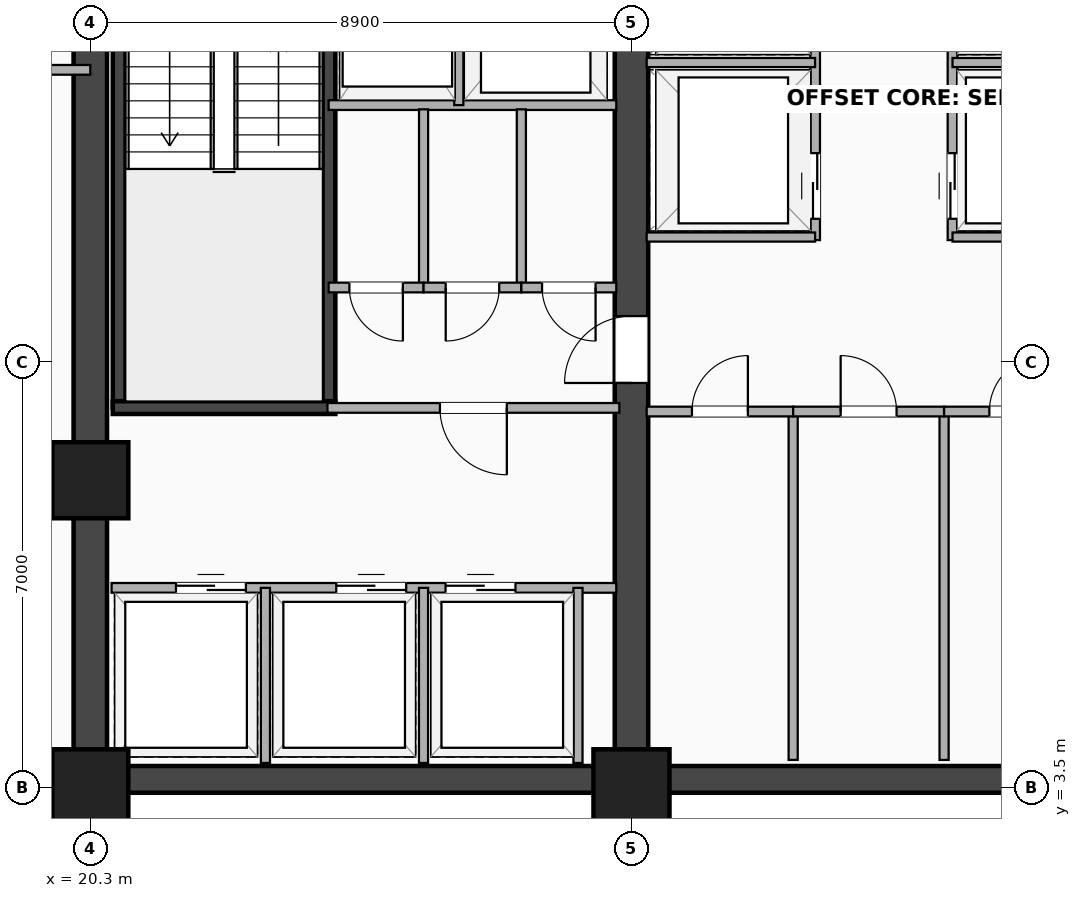
"""IFC4 building model, lengths in metres.
Left out: names, types, materials, properties, quantities, classifications, styles, units other than length and angle.
Written with IfcOpenShell. Run it as: python <this file> out.ifc"""

import sys

from ifc_helpers import new_model, si_unit, direction, frame, frame_2d, origin, origin_2d, place, context, subcontext, project, spatial, rectangle, extrude, element, fill, save


model = new_model("IFC4")
c1 = context("Model", 3, precision=1e-05, world=origin(), true_north=direction((0.0, 1.0)))
c2 = subcontext(c1, "Body", "Model", "MODEL_VIEW")
j1 = project(units=[si_unit("LENGTHUNIT", "METRE"), si_unit("PLANEANGLEUNIT", "RADIAN")], contexts=[c1])
p1 = place(None, origin())
s1 = spatial("IfcSite", under=j1, at=p1, CompositionType="ELEMENT")
p2 = place(p1, origin())
s2 = spatial("IfcBuilding", under=s1, at=p2, CompositionType="ELEMENT")
p3 = place(p2, frame((0.0, 0.0, 98.7)))
s3 = spatial("IfcBuildingStorey", under=s2, at=p3, CompositionType="ELEMENT", Elevation=98.7)
p4 = place(p3, frame((20.3, 3.63, 0.0), z_axis=(0.0, 0.0, 1.0), x_axis=(1.0, 0.0, 0.0)))
e1 = element("IfcWall", 1, at=p4, inside=s3, PredefinedType="SHEAR", context=c2, shape_type="SweptSolid", body=[
    extrude(rectangle(XDim=24.5, YDim=0.44, at=frame_2d((12.25, 0.0))), origin(), (0.0, 0.0, 1.0), 3.24),
])
p5 = place(p3, frame((20.3, 3.5, 0.0), z_axis=(0.0, 0.0, 1.0), x_axis=(0.0, 1.0, 0.0)))
e2 = element("IfcWall", 2, at=p5, inside=s3, PredefinedType="SHEAR", context=c2, shape_type="SweptSolid", body=[
    extrude(rectangle(XDim=16.9, YDim=0.55, at=frame_2d((8.45, 0.0))), origin(), (0.0, 0.0, 1.0), 3.24),
])
p6 = place(p3, frame((29.2, 3.5, 0.0), z_axis=(0.0, 0.0, 1.0), x_axis=(0.0, 1.0, 0.0)))
e3 = element("IfcWall", 3, at=p6, inside=s3, PredefinedType="SHEAR", context=c2, shape_type="SweptSolid", body=[
    extrude(rectangle(XDim=16.9, YDim=0.55, at=frame_2d((8.45, 0.0))), origin(), (0.0, 0.0, 1.0), 3.24),
])
p7 = place(p6, frame((7.75, 0.0, 0.0), z_axis=(0.0, 0.0, 1.0), x_axis=(-1.0, 0.0, 0.0)))
e4 = element("IfcOpeningElement", 4, at=p7, cuts=e3, PredefinedType="OPENING", context=c2, shape_type="SweptSolid", body=[
    extrude(rectangle(XDim=1.1, YDim=2.15, at=frame_2d((0.55, 1.075))), frame((0.0, 0.285, 0.0), z_axis=(0.0, -1.0, 0.0), x_axis=(1.0, 0.0, 0.0)), (0.0, 0.0, 1.0), 0.57),
])
for number, where, z_axis, x_axis in (
    (5, (20.775, 9.745, 0.0), (0.0, 0.0, 1.0), (0.0, 1.0, 0.0)),
    (6, (24.225, 9.745, 0.0), (0.0, 0.0, 1.0), (0.0, 1.0, 0.0)),
):
    element("IfcWall", number, at=place(p3, frame(where, z_axis=z_axis, x_axis=x_axis)), inside=s3, PredefinedType="SHEAR", context=c2, shape_type="SweptSolid", body=[
        extrude(rectangle(XDim=8.01, YDim=0.21, at=frame_2d((4.005, 0.0))), origin(), (0.0, 0.0, 1.0), 3.24),
    ])
p8 = place(p3, frame((20.67, 9.745, 0.0), z_axis=(0.0, 0.0, 1.0), x_axis=(1.0, 0.0, 0.0)))
e7 = element("IfcWall", 7, at=p8, inside=s3, PredefinedType="SHEAR", context=c2, shape_type="SweptSolid", body=[
    extrude(rectangle(XDim=3.66, YDim=0.21, at=frame_2d((1.83, 0.0))), origin(), (0.0, 0.0, 1.0), 3.24),
])
for number, where, z_axis, x_axis in (
    (8, (20.3, 3.5, -0.26), (0.0, 0.0, 1.0), (1.0, 0.0, 0.0)),
    (9, (29.2, 3.5, -0.26), (0.0, 0.0, 1.0), (1.0, 0.0, 0.0)),
    (10, (20.3, 8.55, -0.26), (0.0, 0.0, 1.0), (1.0, 0.0, 0.0)),
):
    element("IfcColumn", number, at=place(p3, frame(where, z_axis=z_axis, x_axis=x_axis)), inside=s3, PredefinedType="COLUMN", context=c2, shape_type="SweptSolid", body=[
        extrude(rectangle(XDim=1.25, YDim=1.25, at=origin_2d()), origin(), (0.0, 0.0, 1.0), 3.5),
    ])
p9 = place(p3, frame((24.22, 14.72, 0.0), z_axis=(0.0, 0.0, 1.0), x_axis=(1.0, 0.0, 0.0)))
e11 = element("IfcWall", 11, at=p9, inside=s3, PredefinedType="PARTITIONING", context=c2, shape_type="SweptSolid", body=[
    extrude(rectangle(XDim=4.73, YDim=0.16, at=frame_2d((2.365, 0.0))), origin(), (0.0, 0.0, 1.0), 3.24),
])
p10 = place(p3, frame((26.36, 14.72, 0.0), z_axis=(0.0, 0.0, 1.0), x_axis=(0.0, 1.0, 0.0)))
e12 = element("IfcWall", 12, at=p10, inside=s3, PredefinedType="PARTITIONING", context=c2, shape_type="SweptSolid", body=[
    extrude(rectangle(XDim=3.04, YDim=0.15, at=frame_2d((1.52, 0.0))), origin(), (0.0, 0.0, 1.0), 3.24),
])
p11 = place(p3, frame((25.781, 11.72, 0.0), z_axis=(0.0, 0.0, 1.0), x_axis=(0.0, 1.0, 0.0)))
e13 = element("IfcWall", 13, at=p11, inside=s3, PredefinedType="PARTITIONING", context=c2, shape_type="SweptSolid", body=[
    extrude(rectangle(XDim=2.93, YDim=0.15, at=frame_2d((1.465, 0.0))), origin(), (0.0, 0.0, 1.0), 3.24),
])
p12 = place(p3, frame((24.22, 11.72, 0.0), z_axis=(0.0, 0.0, 1.0), x_axis=(1.0, 0.0, 0.0)))
e14 = element("IfcWall", 14, at=p12, inside=s3, PredefinedType="PARTITIONING", context=c2, shape_type="SweptSolid", body=[
    extrude(rectangle(XDim=1.561, YDim=0.16, at=frame_2d((0.781, 0.0))), origin(), (0.0, 0.0, 1.0), 3.24),
])
p13 = place(p12, frame((0.341, 0.0, 0.0)))
e15 = element("IfcOpeningElement", 15, at=p13, cuts=e14, PredefinedType="OPENING", context=c2, shape_type="SweptSolid", body=[
    extrude(rectangle(XDim=0.88, YDim=2.08, at=frame_2d((0.44, 1.04))), frame((0.0, 0.09, 0.0), z_axis=(0.0, -1.0, 0.0), x_axis=(1.0, 0.0, 0.0)), (0.0, 0.0, 1.0), 0.18),
])
p14 = place(p3, frame((27.389, 11.72, 0.0), z_axis=(0.0, 0.0, 1.0), x_axis=(0.0, 1.0, 0.0)))
e16 = element("IfcWall", 16, at=p14, inside=s3, PredefinedType="PARTITIONING", context=c2, shape_type="SweptSolid", body=[
    extrude(rectangle(XDim=2.93, YDim=0.15, at=frame_2d((1.465, 0.0))), origin(), (0.0, 0.0, 1.0), 3.24),
])
p15 = place(p3, frame((25.781, 11.72, 0.0), z_axis=(0.0, 0.0, 1.0), x_axis=(1.0, 0.0, 0.0)))
e17 = element("IfcWall", 17, at=p15, inside=s3, PredefinedType="PARTITIONING", context=c2, shape_type="SweptSolid", body=[
    extrude(rectangle(XDim=1.608, YDim=0.16, at=frame_2d((0.804, 0.0))), origin(), (0.0, 0.0, 1.0), 3.24),
])
p16 = place(p15, frame((0.364, 0.0, 0.0)))
e18 = element("IfcOpeningElement", 18, at=p16, cuts=e17, PredefinedType="OPENING", context=c2, shape_type="SweptSolid", body=[
    extrude(rectangle(XDim=0.88, YDim=2.08, at=frame_2d((0.44, 1.04))), frame((0.0, 0.09, 0.0), z_axis=(0.0, -1.0, 0.0), x_axis=(1.0, 0.0, 0.0)), (0.0, 0.0, 1.0), 0.18),
])
p17 = place(p3, frame((27.389, 11.72, 0.0), z_axis=(0.0, 0.0, 1.0), x_axis=(1.0, 0.0, 0.0)))
e19 = element("IfcWall", 19, at=p17, inside=s3, PredefinedType="PARTITIONING", context=c2, shape_type="SweptSolid", body=[
    extrude(rectangle(XDim=1.561, YDim=0.16, at=frame_2d((0.78, 0.0))), origin(), (0.0, 0.0, 1.0), 3.24),
])
p18 = place(p17, frame((0.341, 0.0, 0.0)))
e20 = element("IfcOpeningElement", 20, at=p18, cuts=e19, PredefinedType="OPENING", context=c2, shape_type="SweptSolid", body=[
    extrude(rectangle(XDim=0.88, YDim=2.08, at=frame_2d((0.44, 1.04))), frame((0.0, 0.09, 0.0), z_axis=(0.0, -1.0, 0.0), x_axis=(1.0, 0.0, 0.0)), (0.0, 0.0, 1.0), 0.18),
])
p19 = place(p3, frame((20.65, 6.78, 0.0), z_axis=(0.0, 0.0, 1.0), x_axis=(1.0, 0.0, 0.0)))
e21 = element("IfcWall", 21, at=p19, inside=s3, PredefinedType="PARTITIONING", context=c2, shape_type="SweptSolid", body=[
    extrude(rectangle(XDim=8.3, YDim=0.16, at=frame_2d((4.15, 0.0))), origin(), (0.0, 0.0, 1.0), 2.313),
])
p20 = place(p19, frame((3.695, 0.0, 0.0)))
e22 = element("IfcOpeningElement", 22, at=p20, cuts=e21, PredefinedType="OPENING", context=c2, shape_type="SweptSolid", body=[
    extrude(rectangle(XDim=1.15, YDim=2.2, at=frame_2d((0.575, 1.1))), frame((0.0, 0.09, 0.0), z_axis=(0.0, -1.0, 0.0), x_axis=(1.0, 0.0, 0.0)), (0.0, 0.0, 1.0), 0.18),
])
p21 = place(p19, frame((5.492, 0.0, 0.0)))
e23 = element("IfcOpeningElement", 23, at=p21, cuts=e21, PredefinedType="OPENING", context=c2, shape_type="SweptSolid", body=[
    extrude(rectangle(XDim=1.15, YDim=2.2, at=frame_2d((0.575, 1.1))), frame((0.0, 0.09, 0.0), z_axis=(0.0, -1.0, 0.0), x_axis=(1.0, 0.0, 0.0)), (0.0, 0.0, 1.0), 0.18),
])
p22 = place(p19, frame((1.059, 0.0, 0.0)))
e24 = element("IfcOpeningElement", 24, at=p22, cuts=e21, PredefinedType="OPENING", context=c2, shape_type="SweptSolid", body=[
    extrude(rectangle(XDim=1.15, YDim=2.2, at=frame_2d((0.575, 1.1))), frame((0.0, 0.09, 0.0), z_axis=(0.0, -1.0, 0.0), x_axis=(1.0, 0.0, 0.0)), (0.0, 0.0, 1.0), 0.18),
])
for number, where, z_axis, x_axis in (
    (25, (23.18, 3.9, 0.0), (0.0, 0.0, 1.0), (0.0, 1.0, 0.0)),
    (26, (25.78, 3.9, 0.0), (0.0, 0.0, 1.0), (0.0, 1.0, 0.0)),
    (27, (28.32, 3.9, 0.0), (0.0, 0.0, 1.0), (0.0, 1.0, 0.0)),
):
    element("IfcWall", number, at=place(p3, frame(where, z_axis=z_axis, x_axis=x_axis)), inside=s3, PredefinedType="PARTITIONING", context=c2, shape_type="SweptSolid", body=[
        extrude(rectangle(XDim=2.88, YDim=0.15, at=frame_2d((1.44, 0.0))), origin(), (0.0, 0.0, 1.0), 3.24),
    ])
p23 = place(p3, frame((24.2, 9.74, 0.0), z_axis=(0.0, 0.0, 1.0), x_axis=(1.0, 0.0, 0.0)))
e28 = element("IfcWall", 28, at=p23, inside=s3, PredefinedType="PARTITIONING", context=c2, shape_type="SweptSolid", body=[
    extrude(rectangle(XDim=4.8, YDim=0.16, at=frame_2d((2.4, 0.0))), origin(), (0.0, 0.0, 1.0), 3.24),
])
p24 = place(p23, frame((1.85, 0.0, 0.0)))
e29 = element("IfcOpeningElement", 29, at=p24, cuts=e28, PredefinedType="OPENING", context=c2, shape_type="SweptSolid", body=[
    extrude(rectangle(XDim=1.1, YDim=2.15, at=frame_2d((0.55, 1.075))), frame((0.0, 0.09, 0.0), z_axis=(0.0, -1.0, 0.0), x_axis=(1.0, 0.0, 0.0)), (0.0, 0.0, 1.0), 0.18),
])
p25 = place(p3, frame((31.859, 3.95, 0.0), z_axis=(0.0, 0.0, 1.0), x_axis=(0.0, 1.0, 0.0)))
e30 = element("IfcWall", 30, at=p25, inside=s3, PredefinedType="PARTITIONING", context=c2, shape_type="SweptSolid", body=[
    extrude(rectangle(XDim=5.73, YDim=0.15, at=frame_2d((2.865, 0.0))), origin(), (0.0, 0.0, 1.0), 3.24),
])
p26 = place(p3, frame((29.45, 9.68, 0.0), z_axis=(0.0, 0.0, 1.0), x_axis=(1.0, 0.0, 0.0)))
e31 = element("IfcWall", 31, at=p26, inside=s3, PredefinedType="PARTITIONING", context=c2, shape_type="SweptSolid", body=[
    extrude(rectangle(XDim=2.409, YDim=0.16, at=frame_2d((1.205, 0.0))), origin(), (0.0, 0.0, 1.0), 3.24),
])
p27 = place(p26, frame((1.664, 0.0, 0.0), z_axis=(0.0, 0.0, 1.0), x_axis=(-1.0, 0.0, 0.0)))
e32 = element("IfcOpeningElement", 32, at=p27, cuts=e31, PredefinedType="OPENING", context=c2, shape_type="SweptSolid", body=[
    extrude(rectangle(XDim=0.92, YDim=2.08, at=frame_2d((0.46, 1.04))), frame((0.0, 0.09, 0.0), z_axis=(0.0, -1.0, 0.0), x_axis=(1.0, 0.0, 0.0)), (0.0, 0.0, 1.0), 0.18),
])
p28 = place(p3, frame((34.341, 3.95, 0.0), z_axis=(0.0, 0.0, 1.0), x_axis=(0.0, 1.0, 0.0)))
e33 = element("IfcWall", 33, at=p28, inside=s3, PredefinedType="PARTITIONING", context=c2, shape_type="SweptSolid", body=[
    extrude(rectangle(XDim=5.73, YDim=0.15, at=frame_2d((2.865, 0.0))), origin(), (0.0, 0.0, 1.0), 3.24),
])
p29 = place(p3, frame((31.859, 9.68, 0.0), z_axis=(0.0, 0.0, 1.0), x_axis=(1.0, 0.0, 0.0)))
e34 = element("IfcWall", 34, at=p29, inside=s3, PredefinedType="PARTITIONING", context=c2, shape_type="SweptSolid", body=[
    extrude(rectangle(XDim=2.482, YDim=0.16, at=frame_2d((1.241, 0.0))), origin(), (0.0, 0.0, 1.0), 3.24),
])
p30 = place(p29, frame((1.701, 0.0, 0.0), z_axis=(0.0, 0.0, 1.0), x_axis=(-1.0, 0.0, 0.0)))
e35 = element("IfcOpeningElement", 35, at=p30, cuts=e34, PredefinedType="OPENING", context=c2, shape_type="SweptSolid", body=[
    extrude(rectangle(XDim=0.92, YDim=2.08, at=frame_2d((0.46, 1.04))), frame((0.0, 0.09, 0.0), z_axis=(0.0, -1.0, 0.0), x_axis=(1.0, 0.0, 0.0)), (0.0, 0.0, 1.0), 0.18),
])
p31 = place(p3, frame((34.341, 9.68, 0.0), z_axis=(0.0, 0.0, 1.0), x_axis=(1.0, 0.0, 0.0)))
e36 = element("IfcWall", 36, at=p31, inside=s3, PredefinedType="PARTITIONING", context=c2, shape_type="SweptSolid", body=[
    extrude(rectangle(XDim=2.409, YDim=0.16, at=frame_2d((1.205, 0.0))), origin(), (0.0, 0.0, 1.0), 3.24),
])
p32 = place(p31, frame((1.664, 0.0, 0.0), z_axis=(0.0, 0.0, 1.0), x_axis=(-1.0, 0.0, 0.0)))
e37 = element("IfcOpeningElement", 37, at=p32, cuts=e36, PredefinedType="OPENING", context=c2, shape_type="SweptSolid", body=[
    extrude(rectangle(XDim=0.92, YDim=2.08, at=frame_2d((0.46, 1.04))), frame((0.0, 0.09, 0.0), z_axis=(0.0, -1.0, 0.0), x_axis=(1.0, 0.0, 0.0)), (0.0, 0.0, 1.0), 0.18),
])
p33 = place(p3, frame((32.22, 12.5, 0.0), z_axis=(0.0, 0.0, 1.0), x_axis=(0.0, 1.0, 0.0)))
e38 = element("IfcWall", 38, at=p33, inside=s3, PredefinedType="PARTITIONING", context=c2, shape_type="SweptSolid", body=[
    extrude(rectangle(XDim=7.92, YDim=0.16, at=frame_2d((3.96, 0.0))), origin(), (0.0, 0.0, 1.0), 2.614),
])
p34 = place(p33, frame((1.43, 0.0, 0.0), z_axis=(0.0, 0.0, 1.0), x_axis=(-1.0, 0.0, 0.0)))
e39 = element("IfcOpeningElement", 39, at=p34, cuts=e38, PredefinedType="OPENING", context=c2, shape_type="SweptSolid", body=[
    extrude(rectangle(XDim=1.08, YDim=2.16, at=frame_2d((0.54, 1.08))), frame((0.0, 0.09, 0.0), z_axis=(0.0, -1.0, 0.0), x_axis=(1.0, 0.0, 0.0)), (0.0, 0.0, 1.0), 0.18),
])
p35 = place(p33, frame((4.33, 0.0, 0.0), z_axis=(0.0, 0.0, 1.0), x_axis=(-1.0, 0.0, 0.0)))
e40 = element("IfcOpeningElement", 40, at=p35, cuts=e38, PredefinedType="OPENING", context=c2, shape_type="SweptSolid", body=[
    extrude(rectangle(XDim=1.08, YDim=2.16, at=frame_2d((0.54, 1.08))), frame((0.0, 0.09, 0.0), z_axis=(0.0, -1.0, 0.0), x_axis=(1.0, 0.0, 0.0)), (0.0, 0.0, 1.0), 0.18),
])
p36 = place(p33, frame((6.1, 0.0, 0.0)))
e41 = element("IfcOpeningElement", 41, at=p36, cuts=e38, PredefinedType="OPENING", context=c2, shape_type="SweptSolid", body=[
    extrude(rectangle(XDim=0.88, YDim=2.08, at=frame_2d((0.44, 1.04))), frame((0.0, 0.09, 0.0), z_axis=(0.0, -1.0, 0.0), x_axis=(1.0, 0.0, 0.0)), (0.0, 0.0, 1.0), 0.18),
])
p37 = place(p3, frame((34.48, 12.5, 0.0), z_axis=(0.0, 0.0, 1.0), x_axis=(0.0, 1.0, 0.0)))
e42 = element("IfcWall", 42, at=p37, inside=s3, PredefinedType="PARTITIONING", context=c2, shape_type="SweptSolid", body=[
    extrude(rectangle(XDim=7.92, YDim=0.16, at=frame_2d((3.96, 0.0))), origin(), (0.0, 0.0, 1.0), 2.614),
])
p38 = place(p37, frame((0.35, 0.0, 0.0)))
e43 = element("IfcOpeningElement", 43, at=p38, cuts=e42, PredefinedType="OPENING", context=c2, shape_type="SweptSolid", body=[
    extrude(rectangle(XDim=1.08, YDim=2.16, at=frame_2d((0.54, 1.08))), frame((0.0, 0.09, 0.0), z_axis=(0.0, -1.0, 0.0), x_axis=(1.0, 0.0, 0.0)), (0.0, 0.0, 1.0), 0.18),
])
p39 = place(p37, frame((3.25, 0.0, 0.0)))
e44 = element("IfcOpeningElement", 44, at=p39, cuts=e42, PredefinedType="OPENING", context=c2, shape_type="SweptSolid", body=[
    extrude(rectangle(XDim=1.08, YDim=2.16, at=frame_2d((0.54, 1.08))), frame((0.0, 0.09, 0.0), z_axis=(0.0, -1.0, 0.0), x_axis=(1.0, 0.0, 0.0)), (0.0, 0.0, 1.0), 0.18),
])
p40 = place(p37, frame((6.98, 0.0, 0.0), z_axis=(0.0, 0.0, 1.0), x_axis=(-1.0, 0.0, 0.0)))
e45 = element("IfcOpeningElement", 45, at=p40, cuts=e42, PredefinedType="OPENING", context=c2, shape_type="SweptSolid", body=[
    extrude(rectangle(XDim=0.88, YDim=2.08, at=frame_2d((0.44, 1.04))), frame((0.0, 0.09, 0.0), z_axis=(0.0, -1.0, 0.0), x_axis=(1.0, 0.0, 0.0)), (0.0, 0.0, 1.0), 0.18),
])
p41 = place(p3, frame((29.45, 12.55, 0.0), z_axis=(0.0, 0.0, 1.0), x_axis=(1.0, 0.0, 0.0)))
e46 = element("IfcWall", 46, at=p41, inside=s3, PredefinedType="PARTITIONING", context=c2, shape_type="SweptSolid", body=[
    extrude(rectangle(XDim=2.77, YDim=0.15, at=frame_2d((1.385, 0.0))), origin(), (0.0, 0.0, 1.0), 3.24),
])
p42 = place(p3, frame((34.48, 12.55, 0.0), z_axis=(0.0, 0.0, 1.0), x_axis=(1.0, 0.0, 0.0)))
e47 = element("IfcWall", 47, at=p42, inside=s3, PredefinedType="PARTITIONING", context=c2, shape_type="SweptSolid", body=[
    extrude(rectangle(XDim=2.27, YDim=0.15, at=frame_2d((1.135, 0.0))), origin(), (0.0, 0.0, 1.0), 3.24),
])
p43 = place(p3, frame((29.45, 15.42, 0.0), z_axis=(0.0, 0.0, 1.0), x_axis=(1.0, 0.0, 0.0)))
e48 = element("IfcWall", 48, at=p43, inside=s3, PredefinedType="PARTITIONING", context=c2, shape_type="SweptSolid", body=[
    extrude(rectangle(XDim=2.77, YDim=0.15, at=frame_2d((1.385, 0.0))), origin(), (0.0, 0.0, 1.0), 3.24),
])
p44 = place(p3, frame((34.48, 15.42, 0.0), z_axis=(0.0, 0.0, 1.0), x_axis=(1.0, 0.0, 0.0)))
e49 = element("IfcWall", 49, at=p44, inside=s3, PredefinedType="PARTITIONING", context=c2, shape_type="SweptSolid", body=[
    extrude(rectangle(XDim=2.27, YDim=0.15, at=frame_2d((1.135, 0.0))), origin(), (0.0, 0.0, 1.0), 3.24),
])
p45 = place(p3, frame((16.65, 15.3, 0.0), z_axis=(0.0, 0.0, 1.0), x_axis=(1.0, 0.0, 0.0)))
e50 = element("IfcWall", 50, at=p45, inside=s3, PredefinedType="PARTITIONING", context=c2, shape_type="SweptSolid", body=[
    extrude(rectangle(XDim=3.65, YDim=0.16, at=frame_2d((1.825, 0.0))), origin(), (0.0, 0.0, 1.0), 2.313),
])
p46 = place(p45, frame((1.37, 0.0, 0.0), z_axis=(0.0, 0.0, 1.0), x_axis=(-1.0, 0.0, 0.0)))
e51 = element("IfcOpeningElement", 51, at=p46, cuts=e50, PredefinedType="OPENING", context=c2, shape_type="SweptSolid", body=[
    extrude(rectangle(XDim=0.92, YDim=2.08, at=frame_2d((0.46, 1.04))), frame((0.0, 0.09, 0.0), z_axis=(0.0, -1.0, 0.0), x_axis=(1.0, 0.0, 0.0)), (0.0, 0.0, 1.0), 0.18),
])
p47 = place(p7, origin())
e52 = element("IfcDoor", 52, at=p47, inside=s3, OperationType="SINGLE_SWING_LEFT", PredefinedType="DOOR", context=c2, shape_type="SweptSolid", body=[
    extrude(rectangle(XDim=1.1, YDim=2.15, at=frame_2d((0.55, 1.075))), frame((0.0, 0.025, 0.0), z_axis=(0.0, -1.0, 0.0), x_axis=(1.0, 0.0, 0.0)), (0.0, 0.0, 1.0), 0.05),
])
fill(e4, e52)
p48 = place(p13, origin())
e53 = element("IfcDoor", 53, at=p48, inside=s3, OperationType="SINGLE_SWING_RIGHT", PredefinedType="DOOR", context=c2, shape_type="SweptSolid", body=[
    extrude(rectangle(XDim=0.88, YDim=2.08, at=frame_2d((0.44, 1.04))), frame((0.0, 0.025, 0.0), z_axis=(0.0, -1.0, 0.0), x_axis=(1.0, 0.0, 0.0)), (0.0, 0.0, 1.0), 0.05),
])
fill(e15, e53)
p49 = place(p16, origin())
e54 = element("IfcDoor", 54, at=p49, inside=s3, OperationType="SINGLE_SWING_LEFT", PredefinedType="DOOR", context=c2, shape_type="SweptSolid", body=[
    extrude(rectangle(XDim=0.88, YDim=2.08, at=frame_2d((0.44, 1.04))), frame((0.0, 0.025, 0.0), z_axis=(0.0, -1.0, 0.0), x_axis=(1.0, 0.0, 0.0)), (0.0, 0.0, 1.0), 0.05),
])
fill(e18, e54)
p50 = place(p18, origin())
e55 = element("IfcDoor", 55, at=p50, inside=s3, OperationType="SINGLE_SWING_RIGHT", PredefinedType="DOOR", context=c2, shape_type="SweptSolid", body=[
    extrude(rectangle(XDim=0.88, YDim=2.08, at=frame_2d((0.44, 1.04))), frame((0.0, 0.025, 0.0), z_axis=(0.0, -1.0, 0.0), x_axis=(1.0, 0.0, 0.0)), (0.0, 0.0, 1.0), 0.05),
])
fill(e20, e55)
p51 = place(p20, origin())
e56 = element("IfcDoor", 56, at=p51, inside=s3, OperationType="DOUBLE_DOOR_SLIDING", PredefinedType="DOOR", context=c2, shape_type="SweptSolid", body=[
    extrude(rectangle(XDim=1.15, YDim=2.2, at=frame_2d((0.575, 1.1))), frame((0.0, 0.025, 0.0), z_axis=(0.0, -1.0, 0.0), x_axis=(1.0, 0.0, 0.0)), (0.0, 0.0, 1.0), 0.05),
])
fill(e22, e56)
p52 = place(p21, origin())
e57 = element("IfcDoor", 57, at=p52, inside=s3, OperationType="DOUBLE_DOOR_SLIDING", PredefinedType="DOOR", context=c2, shape_type="SweptSolid", body=[
    extrude(rectangle(XDim=1.15, YDim=2.2, at=frame_2d((0.575, 1.1))), frame((0.0, 0.025, 0.0), z_axis=(0.0, -1.0, 0.0), x_axis=(1.0, 0.0, 0.0)), (0.0, 0.0, 1.0), 0.05),
])
fill(e23, e57)
p53 = place(p22, origin())
e58 = element("IfcDoor", 58, at=p53, inside=s3, OperationType="DOUBLE_DOOR_SLIDING", PredefinedType="DOOR", context=c2, shape_type="SweptSolid", body=[
    extrude(rectangle(XDim=1.15, YDim=2.2, at=frame_2d((0.575, 1.1))), frame((0.0, 0.025, 0.0), z_axis=(0.0, -1.0, 0.0), x_axis=(1.0, 0.0, 0.0)), (0.0, 0.0, 1.0), 0.05),
])
fill(e24, e58)
p54 = place(p24, origin())
e59 = element("IfcDoor", 59, at=p54, inside=s3, OperationType="SINGLE_SWING_RIGHT", PredefinedType="DOOR", context=c2, shape_type="SweptSolid", body=[
    extrude(rectangle(XDim=1.1, YDim=2.15, at=frame_2d((0.55, 1.075))), frame((0.0, 0.025, 0.0), z_axis=(0.0, -1.0, 0.0), x_axis=(1.0, 0.0, 0.0)), (0.0, 0.0, 1.0), 0.05),
])
fill(e29, e59)
p55 = place(p27, origin())
e60 = element("IfcDoor", 60, at=p55, inside=s3, OperationType="SINGLE_SWING_RIGHT", PredefinedType="DOOR", context=c2, shape_type="SweptSolid", body=[
    extrude(rectangle(XDim=0.92, YDim=2.08, at=frame_2d((0.46, 1.04))), frame((0.0, 0.025, 0.0), z_axis=(0.0, -1.0, 0.0), x_axis=(1.0, 0.0, 0.0)), (0.0, 0.0, 1.0), 0.05),
])
fill(e32, e60)
p56 = place(p30, origin())
e61 = element("IfcDoor", 61, at=p56, inside=s3, OperationType="SINGLE_SWING_LEFT", PredefinedType="DOOR", context=c2, shape_type="SweptSolid", body=[
    extrude(rectangle(XDim=0.92, YDim=2.08, at=frame_2d((0.46, 1.04))), frame((0.0, 0.025, 0.0), z_axis=(0.0, -1.0, 0.0), x_axis=(1.0, 0.0, 0.0)), (0.0, 0.0, 1.0), 0.05),
])
fill(e35, e61)
p57 = place(p32, origin())
e62 = element("IfcDoor", 62, at=p57, inside=s3, OperationType="SINGLE_SWING_RIGHT", PredefinedType="DOOR", context=c2, shape_type="SweptSolid", body=[
    extrude(rectangle(XDim=0.92, YDim=2.08, at=frame_2d((0.46, 1.04))), frame((0.0, 0.025, 0.0), z_axis=(0.0, -1.0, 0.0), x_axis=(1.0, 0.0, 0.0)), (0.0, 0.0, 1.0), 0.05),
])
fill(e37, e62)
p58 = place(p34, origin())
e63 = element("IfcDoor", 63, at=p58, inside=s3, OperationType="DOUBLE_DOOR_SLIDING", PredefinedType="DOOR", context=c2, shape_type="SweptSolid", body=[
    extrude(rectangle(XDim=1.08, YDim=2.16, at=frame_2d((0.54, 1.08))), frame((0.0, 0.025, 0.0), z_axis=(0.0, -1.0, 0.0), x_axis=(1.0, 0.0, 0.0)), (0.0, 0.0, 1.0), 0.05),
])
fill(e39, e63)
p59 = place(p38, origin())
e64 = element("IfcDoor", 64, at=p59, inside=s3, OperationType="DOUBLE_DOOR_SLIDING", PredefinedType="DOOR", context=c2, shape_type="SweptSolid", body=[
    extrude(rectangle(XDim=1.08, YDim=2.16, at=frame_2d((0.54, 1.08))), frame((0.0, 0.025, 0.0), z_axis=(0.0, -1.0, 0.0), x_axis=(1.0, 0.0, 0.0)), (0.0, 0.0, 1.0), 0.05),
])
fill(e43, e64)
save(model, sys.argv[1])
